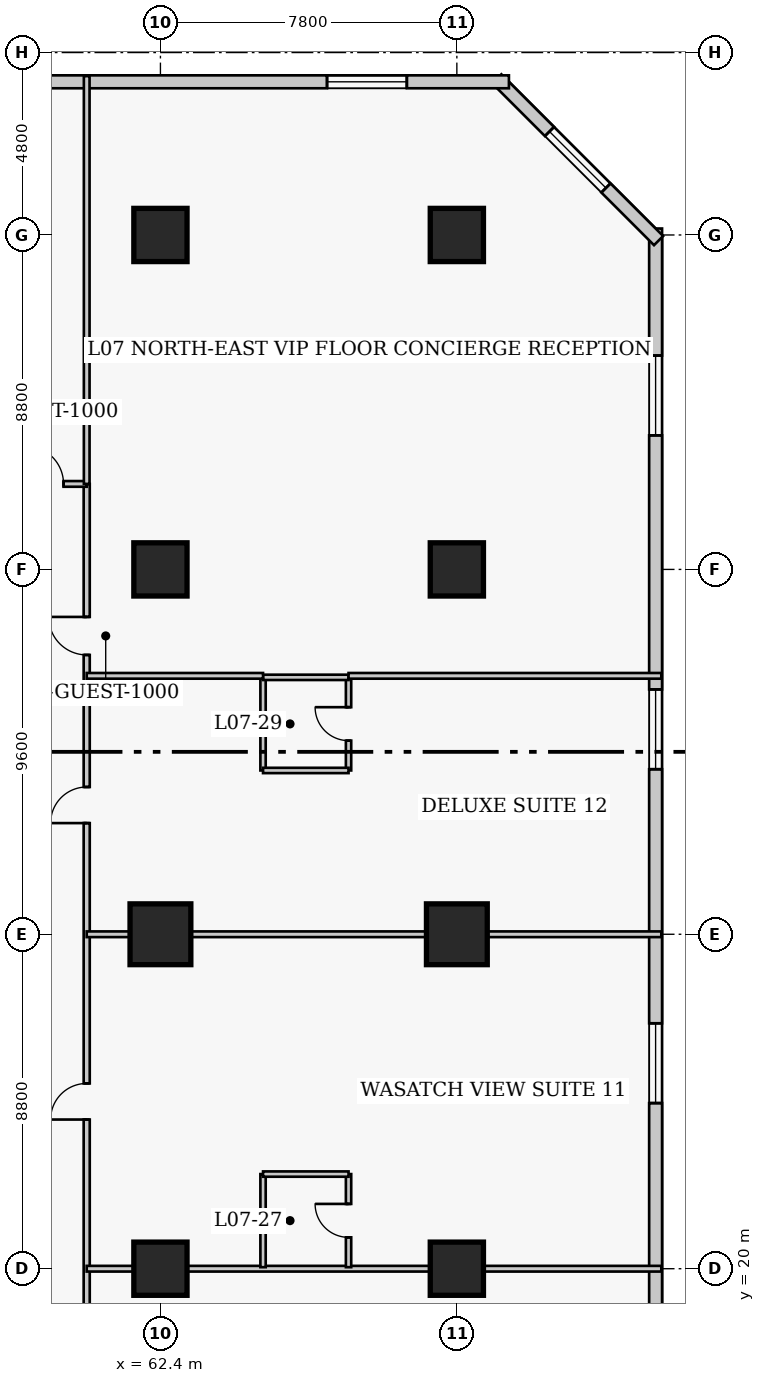
"""IFC4 building model, lengths in metres.
Left out: names, types, materials, properties, quantities, classifications, styles, units other than length and angle.
Written with IfcOpenShell. Run it as: python <this file> out.ifc"""

import sys

from ifc_helpers import new_model, si_unit, direction, frame, frame_2d, origin, origin_2d, place, context, subcontext, project, spatial, rectangle, extrude, element, fill, save


model = new_model("IFC4")
c1 = context("Model", 3, precision=1e-05, world=origin(), true_north=direction((0.0, 1.0)))
c2 = subcontext(c1, "Body", "Model", "MODEL_VIEW")
j1 = project(units=[si_unit("LENGTHUNIT", "METRE"), si_unit("PLANEANGLEUNIT", "RADIAN")], contexts=[c1])
p1 = place(None, origin())
s1 = spatial("IfcSite", under=j1, at=p1, CompositionType="ELEMENT")
p2 = place(p1, origin())
s2 = spatial("IfcBuilding", under=s1, at=p2, CompositionType="ELEMENT")
p3 = place(p2, frame((0.0, 0.0, 33.6)))
s3 = spatial("IfcBuildingStorey", under=s2, at=p3, CompositionType="ELEMENT", Elevation=33.6)
p4 = place(p3, frame((62.4, 20.0, 0.0), z_axis=(0.0, 0.0, 1.0), x_axis=(1.0, 0.0, 0.0)))
e1 = element("IfcColumn", 1, at=p4, inside=s3, PredefinedType="COLUMN", context=c2, shape_type="SweptSolid", body=[
    extrude(rectangle(XDim=1.4, YDim=1.4, at=origin_2d()), origin(), (0.0, 0.0, 1.0), 3.8),
])
p5 = place(p3, frame((62.4, 28.8, 0.0), z_axis=(0.0, 0.0, 1.0), x_axis=(1.0, 0.0, 0.0)))
e2 = element("IfcColumn", 2, at=p5, inside=s3, PredefinedType="COLUMN", context=c2, shape_type="SweptSolid", body=[
    extrude(rectangle(XDim=1.6, YDim=1.6, at=origin_2d()), origin(), (0.0, 0.0, 1.0), 3.8),
])
for number, where, z_axis, x_axis in (
    (3, (62.4, 38.4, 0.0), (0.0, 0.0, 1.0), (1.0, 0.0, 0.0)),
    (4, (62.4, 47.2, 0.0), (0.0, 0.0, 1.0), (1.0, 0.0, 0.0)),
    (5, (70.2, 20.0, 0.0), (0.0, 0.0, 1.0), (1.0, 0.0, 0.0)),
):
    element("IfcColumn", number, at=place(p3, frame(where, z_axis=z_axis, x_axis=x_axis)), inside=s3, PredefinedType="COLUMN", context=c2, shape_type="SweptSolid", body=[
        extrude(rectangle(XDim=1.4, YDim=1.4, at=origin_2d()), origin(), (0.0, 0.0, 1.0), 3.8),
    ])
p6 = place(p3, frame((70.2, 28.8, 0.0), z_axis=(0.0, 0.0, 1.0), x_axis=(1.0, 0.0, 0.0)))
e6 = element("IfcColumn", 6, at=p6, inside=s3, PredefinedType="COLUMN", context=c2, shape_type="SweptSolid", body=[
    extrude(rectangle(XDim=1.6, YDim=1.6, at=origin_2d()), origin(), (0.0, 0.0, 1.0), 3.8),
])
for number, where, z_axis, x_axis in (
    (7, (70.2, 38.4, 0.0), (0.0, 0.0, 1.0), (1.0, 0.0, 0.0)),
    (8, (70.2, 47.2, 0.0), (0.0, 0.0, 1.0), (1.0, 0.0, 0.0)),
):
    element("IfcColumn", number, at=place(p3, frame(where, z_axis=z_axis, x_axis=x_axis)), inside=s3, PredefinedType="COLUMN", context=c2, shape_type="SweptSolid", body=[
        extrude(rectangle(XDim=1.4, YDim=1.4, at=origin_2d()), origin(), (0.0, 0.0, 1.0), 3.8),
    ])
p7 = place(p3, frame((75.43, 12.23, 0.0), z_axis=(0.0, 0.0, 1.0), x_axis=(0.0, 1.0, 0.0)))
e9 = element("IfcWall", 9, at=p7, inside=s3, PredefinedType="SOLIDWALL", context=c2, shape_type="SweptSolid", body=[
    extrude(rectangle(XDim=35.14, YDim=0.34, at=frame_2d((17.57, 0.0))), origin(), (0.0, 0.0, 1.0), 3.54),
])
p8 = place(p7, frame((3.343, 0.0, 0.85)))
e10 = element("IfcOpeningElement", 10, at=p8, cuts=e9, PredefinedType="OPENING", context=c2, shape_type="SweptSolid", body=[
    extrude(rectangle(XDim=2.1, YDim=1.85, at=frame_2d((1.05, 0.925))), frame((0.0, 0.18, 0.0), z_axis=(0.0, -1.0, 0.0), x_axis=(1.0, 0.0, 0.0)), (0.0, 0.0, 1.0), 0.36),
])
p9 = place(p7, frame((12.127, 0.0, 0.85)))
e11 = element("IfcOpeningElement", 11, at=p9, cuts=e9, PredefinedType="OPENING", context=c2, shape_type="SweptSolid", body=[
    extrude(rectangle(XDim=2.1, YDim=1.85, at=frame_2d((1.05, 0.925))), frame((0.0, 0.18, 0.0), z_axis=(0.0, -1.0, 0.0), x_axis=(1.0, 0.0, 0.0)), (0.0, 0.0, 1.0), 0.36),
])
p10 = place(p7, frame((20.913, 0.0, 0.85)))
e12 = element("IfcOpeningElement", 12, at=p10, cuts=e9, PredefinedType="OPENING", context=c2, shape_type="SweptSolid", body=[
    extrude(rectangle(XDim=2.1, YDim=1.85, at=frame_2d((1.05, 0.925))), frame((0.0, 0.18, 0.0), z_axis=(0.0, -1.0, 0.0), x_axis=(1.0, 0.0, 0.0)), (0.0, 0.0, 1.0), 0.36),
])
p11 = place(p7, frame((29.698, 0.0, 0.85)))
e13 = element("IfcOpeningElement", 13, at=p11, cuts=e9, PredefinedType="OPENING", context=c2, shape_type="SweptSolid", body=[
    extrude(rectangle(XDim=2.1, YDim=1.85, at=frame_2d((1.05, 0.925))), frame((0.0, 0.18, 0.0), z_axis=(0.0, -1.0, 0.0), x_axis=(1.0, 0.0, 0.0)), (0.0, 0.0, 1.0), 0.36),
])
p12 = place(p3, frame((75.508, 47.052, 0.0), z_axis=(0.0, 0.0, 1.0), x_axis=(-0.707106781187, 0.707106781187, 0.0)))
e14 = element("IfcWall", 14, at=p12, inside=s3, PredefinedType="SOLIDWALL", context=c2, shape_type="SweptSolid", body=[
    extrude(rectangle(XDim=6.02, YDim=0.34, at=frame_2d((3.01, 0.0))), origin(), (0.0, 0.0, 1.0), 3.54),
])
p13 = place(p12, frame((1.96, 0.0, 0.85)))
e15 = element("IfcOpeningElement", 15, at=p13, cuts=e14, PredefinedType="OPENING", context=c2, shape_type="SweptSolid", body=[
    extrude(rectangle(XDim=2.1, YDim=1.85, at=frame_2d((1.05, 0.925))), frame((0.0, 0.18, 0.0), z_axis=(0.0, -1.0, 0.0), x_axis=(1.0, 0.0, 0.0)), (0.0, 0.0, 1.0), 0.36),
])
p14 = place(p3, frame((71.57, 51.23, 0.0), z_axis=(0.0, 0.0, 1.0), x_axis=(-1.0, 0.0, 0.0)))
e16 = element("IfcWall", 16, at=p14, inside=s3, PredefinedType="SOLIDWALL", context=c2, shape_type="SweptSolid", body=[
    extrude(rectangle(XDim=29.89, YDim=0.34, at=frame_2d((14.945, 0.0))), origin(), (0.0, 0.0, 1.0), 3.54),
])
p15 = place(p14, frame((2.686, 0.0, 0.85)))
e17 = element("IfcOpeningElement", 17, at=p15, cuts=e16, PredefinedType="OPENING", context=c2, shape_type="SweptSolid", body=[
    extrude(rectangle(XDim=2.1, YDim=1.85, at=frame_2d((1.05, 0.925))), frame((0.0, 0.18, 0.0), z_axis=(0.0, -1.0, 0.0), x_axis=(1.0, 0.0, 0.0)), (0.0, 0.0, 1.0), 0.36),
])
p16 = place(p14, frame((17.631, 0.0, 0.85)))
e18 = element("IfcOpeningElement", 18, at=p16, cuts=e16, PredefinedType="OPENING", context=c2, shape_type="SweptSolid", body=[
    extrude(rectangle(XDim=2.1, YDim=1.85, at=frame_2d((1.05, 0.925))), frame((0.0, 0.18, 0.0), z_axis=(0.0, -1.0, 0.0), x_axis=(1.0, 0.0, 0.0)), (0.0, 0.0, 1.0), 0.36),
])
p17 = place(p14, frame((25.104, 0.0, 0.85)))
e19 = element("IfcOpeningElement", 19, at=p17, cuts=e16, PredefinedType="OPENING", context=c2, shape_type="SweptSolid", body=[
    extrude(rectangle(XDim=2.1, YDim=1.85, at=frame_2d((1.05, 0.925))), frame((0.0, 0.18, 0.0), z_axis=(0.0, -1.0, 0.0), x_axis=(1.0, 0.0, 0.0)), (0.0, 0.0, 1.0), 0.36),
])
p18 = place(p3, frame((60.46, 10.25, 0.0), z_axis=(0.0, 0.0, 1.0), x_axis=(0.0, 1.0, 0.0)))
e20 = element("IfcWall", 20, at=p18, inside=s3, PredefinedType="PARTITIONING", context=c2, shape_type="SweptSolid", body=[
    extrude(rectangle(XDim=30.4, YDim=0.16, at=frame_2d((15.2, 0.0))), origin(), (0.0, 0.0, 1.0), 3.54),
])
p19 = place(p18, frame((4.4, 0.0, 0.0)))
e21 = element("IfcOpeningElement", 21, at=p19, cuts=e20, PredefinedType="OPENING", context=c2, shape_type="SweptSolid", body=[
    extrude(rectangle(XDim=0.95, YDim=2.1, at=frame_2d((0.475, 1.05))), frame((0.0, 0.09, 0.0), z_axis=(0.0, -1.0, 0.0), x_axis=(1.0, 0.0, 0.0)), (0.0, 0.0, 1.0), 0.18),
])
p20 = place(p18, frame((13.675, 0.0, 0.0)))
e22 = element("IfcOpeningElement", 22, at=p20, cuts=e20, PredefinedType="OPENING", context=c2, shape_type="SweptSolid", body=[
    extrude(rectangle(XDim=0.95, YDim=2.1, at=frame_2d((0.475, 1.05))), frame((0.0, 0.09, 0.0), z_axis=(0.0, -1.0, 0.0), x_axis=(1.0, 0.0, 0.0)), (0.0, 0.0, 1.0), 0.18),
])
p21 = place(p18, frame((21.475, 0.0, 0.0)))
e23 = element("IfcOpeningElement", 23, at=p21, cuts=e20, PredefinedType="OPENING", context=c2, shape_type="SweptSolid", body=[
    extrude(rectangle(XDim=0.95, YDim=2.1, at=frame_2d((0.475, 1.05))), frame((0.0, 0.09, 0.0), z_axis=(0.0, -1.0, 0.0), x_axis=(1.0, 0.0, 0.0)), (0.0, 0.0, 1.0), 0.18),
])
p22 = place(p18, frame((25.9, 0.0, 0.0)))
e24 = element("IfcOpeningElement", 24, at=p22, cuts=e20, PredefinedType="OPENING", context=c2, shape_type="SweptSolid", body=[
    extrude(rectangle(XDim=1.0, YDim=2.15, at=frame_2d((0.5, 1.075))), frame((0.0, 0.09, 0.0), z_axis=(0.0, -1.0, 0.0), x_axis=(1.0, 0.0, 0.0)), (0.0, 0.0, 1.0), 0.18),
])
p23 = place(p3, frame((56.8, 40.65, 0.0), z_axis=(0.0, 0.0, 1.0), x_axis=(1.0, 0.0, 0.0)))
e25 = element("IfcWall", 25, at=p23, inside=s3, PredefinedType="PARTITIONING", context=c2, shape_type="SweptSolid", body=[
    extrude(rectangle(XDim=3.66, YDim=0.15, at=frame_2d((1.83, 0.0))), origin(), (0.0, 0.0, 1.0), 3.54),
])
p24 = place(p23, frame((2.05, 0.0, 0.0)))
e26 = element("IfcOpeningElement", 26, at=p24, cuts=e25, PredefinedType="OPENING", context=c2, shape_type="SweptSolid", body=[
    extrude(rectangle(XDim=1.0, YDim=2.15, at=frame_2d((0.5, 1.075))), frame((0.0, 0.085, 0.0), z_axis=(0.0, -1.0, 0.0), x_axis=(1.0, 0.0, 0.0)), (0.0, 0.0, 1.0), 0.17),
])
p25 = place(p3, frame((60.46, 40.65, 0.0), z_axis=(0.0, 0.0, 1.0), x_axis=(0.0, 1.0, 0.0)))
e27 = element("IfcWall", 27, at=p25, inside=s3, PredefinedType="PARTITIONING", context=c2, shape_type="SweptSolid", body=[
    extrude(rectangle(XDim=10.73, YDim=0.15, at=frame_2d((5.365, 0.0))), origin(), (0.0, 0.0, 1.0), 3.54),
])
p26 = place(p3, frame((60.46, 20.0, 0.0), z_axis=(0.0, 0.0, 1.0), x_axis=(1.0, 0.0, 0.0)))
e28 = element("IfcWall", 28, at=p26, inside=s3, PredefinedType="PARTITIONING", context=c2, shape_type="SweptSolid", body=[
    extrude(rectangle(XDim=15.12, YDim=0.15, at=frame_2d((7.56, 0.0))), origin(), (0.0, 0.0, 1.0), 2.593),
])
p27 = place(p3, frame((65.1, 20.04, 0.0), z_axis=(0.0, 0.0, 1.0), x_axis=(0.0, 1.0, 0.0)))
e29 = element("IfcWall", 29, at=p27, inside=s3, PredefinedType="PLUMBINGWALL", context=c2, shape_type="SweptSolid", body=[
    extrude(rectangle(XDim=2.45, YDim=0.14, at=frame_2d((1.225, 0.0))), origin(), (0.0, 0.0, 1.0), 3.54),
])
p28 = place(p3, frame((67.35, 20.04, 0.0), z_axis=(0.0, 0.0, 1.0), x_axis=(0.0, 1.0, 0.0)))
e30 = element("IfcWall", 30, at=p28, inside=s3, PredefinedType="PLUMBINGWALL", context=c2, shape_type="SweptSolid", body=[
    extrude(rectangle(XDim=2.45, YDim=0.14, at=frame_2d((1.225, 0.0))), origin(), (0.0, 0.0, 1.0), 3.54),
])
p29 = place(p28, frame((0.785, 0.0, 0.0)))
e31 = element("IfcOpeningElement", 31, at=p29, cuts=e30, PredefinedType="OPENING", context=c2, shape_type="SweptSolid", body=[
    extrude(rectangle(XDim=0.88, YDim=2.05, at=frame_2d((0.44, 1.025))), frame((0.0, 0.08, 0.0), z_axis=(0.0, -1.0, 0.0), x_axis=(1.0, 0.0, 0.0)), (0.0, 0.0, 1.0), 0.16),
])
p30 = place(p3, frame((65.1, 22.49, 0.0), z_axis=(0.0, 0.0, 1.0), x_axis=(1.0, 0.0, 0.0)))
e32 = element("IfcWall", 32, at=p30, inside=s3, PredefinedType="PLUMBINGWALL", context=c2, shape_type="SweptSolid", body=[
    extrude(rectangle(XDim=2.25, YDim=0.14, at=frame_2d((1.125, 0.0))), origin(), (0.0, 0.0, 1.0), 3.54),
])
p31 = place(p3, frame((60.46, 28.8, 0.0), z_axis=(0.0, 0.0, 1.0), x_axis=(1.0, 0.0, 0.0)))
e33 = element("IfcWall", 33, at=p31, inside=s3, PredefinedType="PARTITIONING", context=c2, shape_type="SweptSolid", body=[
    extrude(rectangle(XDim=15.12, YDim=0.15, at=frame_2d((7.56, 0.0))), origin(), (0.0, 0.0, 1.0), 2.593),
])
p32 = place(p3, frame((65.1, 33.11, 0.0), z_axis=(0.0, 0.0, 1.0), x_axis=(0.0, 1.0, 0.0)))
e34 = element("IfcWall", 34, at=p32, inside=s3, PredefinedType="PLUMBINGWALL", context=c2, shape_type="SweptSolid", body=[
    extrude(rectangle(XDim=2.45, YDim=0.14, at=frame_2d((1.225, 0.0))), origin(), (0.0, 0.0, 1.0), 3.54),
])
p33 = place(p3, frame((67.35, 33.11, 0.0), z_axis=(0.0, 0.0, 1.0), x_axis=(0.0, 1.0, 0.0)))
e35 = element("IfcWall", 35, at=p33, inside=s3, PredefinedType="PLUMBINGWALL", context=c2, shape_type="SweptSolid", body=[
    extrude(rectangle(XDim=2.45, YDim=0.14, at=frame_2d((1.225, 0.0))), origin(), (0.0, 0.0, 1.0), 3.54),
])
p34 = place(p33, frame((0.785, 0.0, 0.0)))
e36 = element("IfcOpeningElement", 36, at=p34, cuts=e35, PredefinedType="OPENING", context=c2, shape_type="SweptSolid", body=[
    extrude(rectangle(XDim=0.88, YDim=2.05, at=frame_2d((0.44, 1.025))), frame((0.0, 0.08, 0.0), z_axis=(0.0, -1.0, 0.0), x_axis=(1.0, 0.0, 0.0)), (0.0, 0.0, 1.0), 0.16),
])
for number, where, z_axis, x_axis in (
    (37, (65.1, 33.11, 0.0), (0.0, 0.0, 1.0), (1.0, 0.0, 0.0)),
    (38, (65.1, 35.56, 0.0), (0.0, 0.0, 1.0), (1.0, 0.0, 0.0)),
):
    element("IfcWall", number, at=place(p3, frame(where, z_axis=z_axis, x_axis=x_axis)), inside=s3, PredefinedType="PLUMBINGWALL", context=c2, shape_type="SweptSolid", body=[
        extrude(rectangle(XDim=2.25, YDim=0.14, at=frame_2d((1.125, 0.0))), origin(), (0.0, 0.0, 1.0), 3.54),
    ])
p35 = place(p3, frame((60.46, 35.6, 0.0), z_axis=(0.0, 0.0, 1.0), x_axis=(1.0, 0.0, 0.0)))
e39 = element("IfcWall", 39, at=p35, inside=s3, PredefinedType="PARTITIONING", context=c2, shape_type="SweptSolid", body=[
    extrude(rectangle(XDim=4.64, YDim=0.15, at=frame_2d((2.32, 0.0))), origin(), (0.0, 0.0, 1.0), 3.54),
])
p36 = place(p3, frame((67.35, 35.6, 0.0), z_axis=(0.0, 0.0, 1.0), x_axis=(1.0, 0.0, 0.0)))
e40 = element("IfcWall", 40, at=p36, inside=s3, PredefinedType="PARTITIONING", context=c2, shape_type="SweptSolid", body=[
    extrude(rectangle(XDim=8.23, YDim=0.15, at=frame_2d((4.115, 0.0))), origin(), (0.0, 0.0, 1.0), 3.54),
])
p37 = place(p9, origin())
e41 = element("IfcWindow", 41, at=p37, inside=s3, PartitioningType="SINGLE_PANEL", PredefinedType="WINDOW", context=c2, shape_type="SweptSolid", body=[
    extrude(rectangle(XDim=2.1, YDim=1.85, at=frame_2d((1.05, 0.925))), frame((0.0, 0.03, 0.0), z_axis=(0.0, -1.0, 0.0), x_axis=(1.0, 0.0, 0.0)), (0.0, 0.0, 1.0), 0.06),
])
fill(e11, e41)
p38 = place(p10, origin())
e42 = element("IfcWindow", 42, at=p38, inside=s3, PartitioningType="SINGLE_PANEL", PredefinedType="WINDOW", context=c2, shape_type="SweptSolid", body=[
    extrude(rectangle(XDim=2.1, YDim=1.85, at=frame_2d((1.05, 0.925))), frame((0.0, 0.03, 0.0), z_axis=(0.0, -1.0, 0.0), x_axis=(1.0, 0.0, 0.0)), (0.0, 0.0, 1.0), 0.06),
])
fill(e12, e42)
p39 = place(p11, origin())
e43 = element("IfcWindow", 43, at=p39, inside=s3, PartitioningType="SINGLE_PANEL", PredefinedType="WINDOW", context=c2, shape_type="SweptSolid", body=[
    extrude(rectangle(XDim=2.1, YDim=1.85, at=frame_2d((1.05, 0.925))), frame((0.0, 0.03, 0.0), z_axis=(0.0, -1.0, 0.0), x_axis=(1.0, 0.0, 0.0)), (0.0, 0.0, 1.0), 0.06),
])
fill(e13, e43)
p40 = place(p13, origin())
e44 = element("IfcWindow", 44, at=p40, inside=s3, PartitioningType="SINGLE_PANEL", PredefinedType="WINDOW", context=c2, shape_type="SweptSolid", body=[
    extrude(rectangle(XDim=2.1, YDim=1.85, at=frame_2d((1.05, 0.925))), frame((0.0, 0.03, 0.0), z_axis=(0.0, -1.0, 0.0), x_axis=(1.0, 0.0, 0.0)), (0.0, 0.0, 1.0), 0.06),
])
fill(e15, e44)
p41 = place(p15, origin())
e45 = element("IfcWindow", 45, at=p41, inside=s3, PartitioningType="SINGLE_PANEL", PredefinedType="WINDOW", context=c2, shape_type="SweptSolid", body=[
    extrude(rectangle(XDim=2.1, YDim=1.85, at=frame_2d((1.05, 0.925))), frame((0.0, 0.03, 0.0), z_axis=(0.0, -1.0, 0.0), x_axis=(1.0, 0.0, 0.0)), (0.0, 0.0, 1.0), 0.06),
])
fill(e17, e45)
p42 = place(p24, origin())
e46 = element("IfcDoor", 46, at=p42, inside=s3, OperationType="SINGLE_SWING_LEFT", PredefinedType="DOOR", context=c2, shape_type="SweptSolid", body=[
    extrude(rectangle(XDim=1.0, YDim=2.15, at=frame_2d((0.5, 1.075))), frame((0.0, 0.025, 0.0), z_axis=(0.0, -1.0, 0.0), x_axis=(1.0, 0.0, 0.0)), (0.0, 0.0, 1.0), 0.05),
])
fill(e26, e46)
p43 = place(p29, origin())
e47 = element("IfcDoor", 47, at=p43, inside=s3, OperationType="SINGLE_SWING_RIGHT", PredefinedType="DOOR", context=c2, shape_type="SweptSolid", body=[
    extrude(rectangle(XDim=0.88, YDim=2.05, at=frame_2d((0.44, 1.025))), frame((0.0, 0.025, 0.0), z_axis=(0.0, -1.0, 0.0), x_axis=(1.0, 0.0, 0.0)), (0.0, 0.0, 1.0), 0.05),
])
fill(e31, e47)
p44 = place(p20, origin())
e48 = element("IfcDoor", 48, at=p44, inside=s3, OperationType="SINGLE_SWING_LEFT", PredefinedType="DOOR", context=c2, shape_type="SweptSolid", body=[
    extrude(rectangle(XDim=0.95, YDim=2.1, at=frame_2d((0.475, 1.05))), frame((0.0, 0.025, 0.0), z_axis=(0.0, -1.0, 0.0), x_axis=(1.0, 0.0, 0.0)), (0.0, 0.0, 1.0), 0.05),
])
fill(e22, e48)
p45 = place(p34, origin())
e49 = element("IfcDoor", 49, at=p45, inside=s3, OperationType="SINGLE_SWING_RIGHT", PredefinedType="DOOR", context=c2, shape_type="SweptSolid", body=[
    extrude(rectangle(XDim=0.88, YDim=2.05, at=frame_2d((0.44, 1.025))), frame((0.0, 0.025, 0.0), z_axis=(0.0, -1.0, 0.0), x_axis=(1.0, 0.0, 0.0)), (0.0, 0.0, 1.0), 0.05),
])
fill(e36, e49)
p46 = place(p21, origin())
e50 = element("IfcDoor", 50, at=p46, inside=s3, OperationType="SINGLE_SWING_LEFT", PredefinedType="DOOR", context=c2, shape_type="SweptSolid", body=[
    extrude(rectangle(XDim=0.95, YDim=2.1, at=frame_2d((0.475, 1.05))), frame((0.0, 0.025, 0.0), z_axis=(0.0, -1.0, 0.0), x_axis=(1.0, 0.0, 0.0)), (0.0, 0.0, 1.0), 0.05),
])
fill(e23, e50)
p47 = place(p22, origin())
e51 = element("IfcDoor", 51, at=p47, inside=s3, OperationType="SINGLE_SWING_RIGHT", PredefinedType="DOOR", context=c2, shape_type="SweptSolid", body=[
    extrude(rectangle(XDim=1.0, YDim=2.15, at=frame_2d((0.5, 1.075))), frame((0.0, 0.025, 0.0), z_axis=(0.0, -1.0, 0.0), x_axis=(1.0, 0.0, 0.0)), (0.0, 0.0, 1.0), 0.05),
])
fill(e24, e51)
save(model, sys.argv[1])
